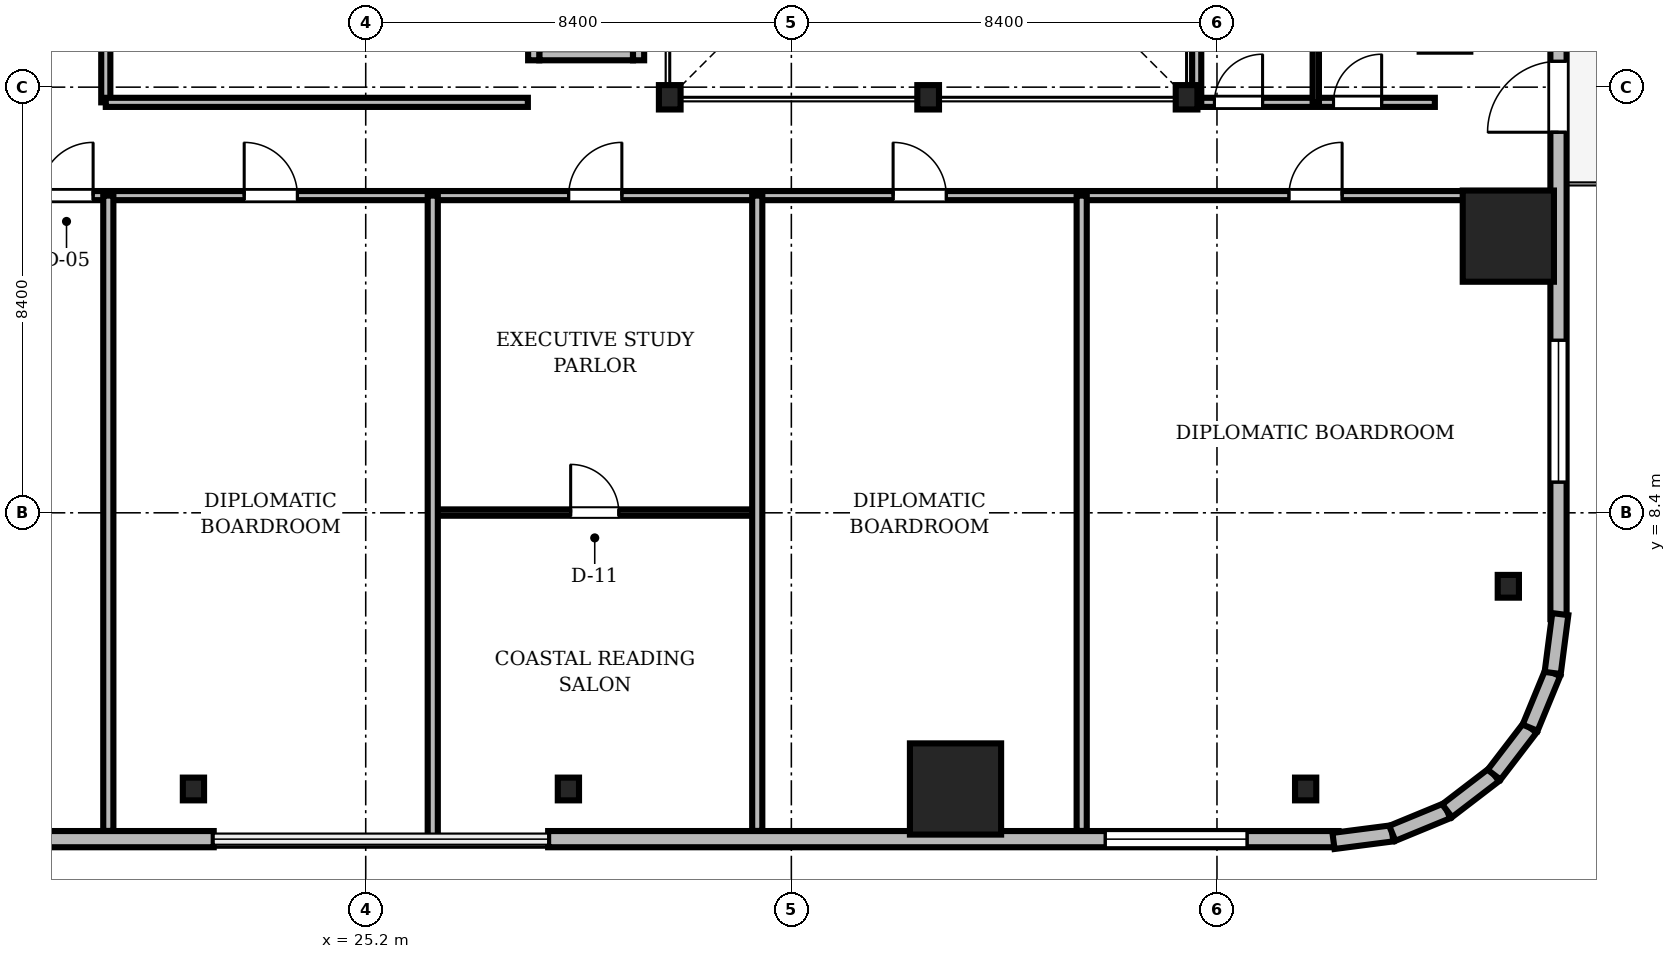
"""IFC4 building model, lengths in metres.
Left out: names, types, materials, properties, quantities, classifications, styles, units other than length and angle.
Written with IfcOpenShell. Run it as: python <this file> out.ifc"""

import sys

from ifc_helpers import new_model, si_unit, direction, frame, frame_2d, origin, origin_2d, place, context, subcontext, project, spatial, rectangle, i_section, extrude, source, transform, mapped, element, fill, save


model = new_model("IFC4")
c1 = context("Model", 3, precision=1e-05, world=origin(), true_north=direction((0.0, 1.0)))
c2 = subcontext(c1, "Body", "Model", "MODEL_VIEW")
j1 = project(units=[si_unit("LENGTHUNIT", "METRE"), si_unit("PLANEANGLEUNIT", "RADIAN")], contexts=[c1])
p1 = place(None, origin())
s1 = spatial("IfcSite", under=j1, at=p1, CompositionType="ELEMENT")
p2 = place(p1, origin())
s2 = spatial("IfcBuilding", under=s1, at=p2, CompositionType="ELEMENT")
p3 = place(p2, frame((0.0, 0.0, 34.9)))
s3 = spatial("IfcBuildingStorey", under=s2, at=p3, CompositionType="ELEMENT", Elevation=34.9)
m1 = source(origin(), c2, "Body", "SweptSolid", [
    extrude(i_section(OverallWidth=0.428, OverallDepth=0.481, WebThickness=0.04, FlangeThickness=0.063, FilletRadius=0.015, at=origin_2d()), origin(), (0.0, 0.0, 1.0), 3.41),
])
for number, where, z_axis, x_axis in (
    (1, (31.2, 16.6, 0.0), (0.0, 0.0, 1.0), (1.0, 0.0, 0.0)),
    (2, (36.3, 16.6, 0.0), (0.0, 0.0, 1.0), (1.0, 0.0, 0.0)),
    (3, (41.4, 16.6, 0.0), (0.0, 0.0, 1.0), (1.0, 0.0, 0.0)),
):
    element("IfcColumn", number, at=place(p3, frame(where, z_axis=z_axis, x_axis=x_axis)), inside=s3, PredefinedType="COLUMN", context=c2, shape_type="MappedRepresentation", body=[
        mapped(m1, transform((0.0, 0.0, 0.0), scale=1.0)),
    ])
m2 = source(origin(), c2, "Body", "SweptSolid", [
    extrude(rectangle(XDim=1.8, YDim=1.8, at=origin_2d()), origin(), (0.0, 0.0, 1.0), 3.41),
])
for number, where, z_axis, x_axis in (
    (4, (36.84, 2.95, 0.0), (0.0, 0.0, 1.0), (1.0, 0.0, 0.0)),
    (5, (47.75, 13.86, 0.0), (0.0, 0.0, 1.0), (1.0, 0.0, 0.0)),
):
    element("IfcColumn", number, at=place(p3, frame(where, z_axis=z_axis, x_axis=x_axis)), inside=s3, PredefinedType="COLUMN", context=c2, shape_type="MappedRepresentation", body=[
        mapped(m2, transform((0.0, 0.0, 0.0), scale=1.0)),
    ])
m3 = source(origin(), c2, "Body", "SweptSolid", [
    extrude(i_section(OverallWidth=0.419, OverallDepth=0.449, WebThickness=0.031, FlangeThickness=0.048, FilletRadius=0.015, at=origin_2d()), origin(), (0.0, 0.0, 1.0), 3.41),
])
for number, where, z_axis, x_axis in (
    (6, (21.8, 2.95, 0.0), (0.0, 0.0, 1.0), (1.0, 0.0, 0.0)),
    (7, (29.2, 2.95, 0.0), (0.0, 0.0, 1.0), (1.0, 0.0, 0.0)),
    (8, (43.75, 2.95, 0.0), (0.0, 0.0, 1.0), (1.0, 0.0, 0.0)),
    (9, (47.75, 6.95, 0.0), (0.0, 0.0, 1.0), (1.0, 0.0, 0.0)),
):
    element("IfcColumn", number, at=place(p3, frame(where, z_axis=z_axis, x_axis=x_axis)), inside=s3, PredefinedType="COLUMN", context=c2, shape_type="MappedRepresentation", body=[
        mapped(m3, transform((0.0, 0.0, 0.0), scale=1.0)),
    ])
m4 = source(origin(), c2, "Body", "SweptSolid", [
    extrude(rectangle(XDim=15.6, YDim=0.32, at=frame_2d((7.8, 0.0))), origin(), (0.0, 0.0, 1.0), 3.41),
])
p4 = place(p3, frame((6.6, 1.96, 0.0), z_axis=(0.0, 0.0, 1.0), x_axis=(1.0, 0.0, 0.0)))
e10 = element("IfcWall", 10, at=p4, inside=s3, PredefinedType="SOLIDWALL", context=c2, shape_type="MappedRepresentation", body=[
    mapped(m4, transform((0.0, 0.0, 0.0), scale=1.0)),
])
m5 = source(origin(), c2, "Body", "SweptSolid", [
    extrude(rectangle(XDim=1.4, YDim=2.3, at=frame_2d((0.7, 1.15))), frame((0.0, 0.17, 0.0), z_axis=(0.0, -1.0, 0.0), x_axis=(1.0, 0.0, 0.0)), (0.0, 0.0, 1.0), 0.34),
])
p5 = place(p4, frame((9.61, 0.0, 0.0)))
e11 = element("IfcOpeningElement", 11, at=p5, cuts=e10, PredefinedType="OPENING", context=c2, shape_type="MappedRepresentation", body=[
    mapped(m5, transform((0.0, 0.0, 0.0), scale=1.0)),
])
m6 = source(origin(), c2, "Body", "SweptSolid", [
    extrude(rectangle(XDim=2.8, YDim=2.4, at=frame_2d((1.4, 1.2))), frame((0.0, 0.17, 0.0), z_axis=(0.0, -1.0, 0.0), x_axis=(1.0, 0.0, 0.0)), (0.0, 0.0, 1.0), 0.34),
])
p6 = place(p4, frame((2.705, 0.0, 0.72)))
e12 = element("IfcOpeningElement", 12, at=p6, cuts=e10, PredefinedType="OPENING", context=c2, shape_type="MappedRepresentation", body=[
    mapped(m6, transform((0.0, 0.0, 0.0), scale=1.0)),
])
p7 = place(p3, frame((28.8, 1.96, 0.0), z_axis=(0.0, 0.0, 1.0), x_axis=(1.0, 0.0, 0.0)))
e13 = element("IfcWall", 13, at=p7, inside=s3, PredefinedType="SOLIDWALL", context=c2, shape_type="MappedRepresentation", body=[
    mapped(m4, transform((0.0, 0.0, 0.0), scale=1.0)),
])
p8 = place(p7, frame((10.995, 0.0, 0.72)))
e14 = element("IfcOpeningElement", 14, at=p8, cuts=e13, PredefinedType="OPENING", context=c2, shape_type="MappedRepresentation", body=[
    mapped(m6, transform((0.0, 0.0, 0.0), scale=1.0)),
])
p9 = place(p3, frame((48.74, 6.3, 0.0), z_axis=(0.0, 0.0, 1.0), x_axis=(0.0, 1.0, 0.0)))
e15 = element("IfcWall", 15, at=p9, inside=s3, PredefinedType="SOLIDWALL", context=c2, shape_type="MappedRepresentation", body=[
    mapped(m4, transform((0.0, 0.0, 0.0), scale=1.0)),
])
p10 = place(p9, frame((9.61, 0.0, 0.0)))
e16 = element("IfcOpeningElement", 16, at=p10, cuts=e15, PredefinedType="OPENING", context=c2, shape_type="MappedRepresentation", body=[
    mapped(m5, transform((0.0, 0.0, 0.0), scale=1.0)),
])
p11 = place(p9, frame((2.705, 0.0, 0.72)))
e17 = element("IfcOpeningElement", 17, at=p11, cuts=e15, PredefinedType="OPENING", context=c2, shape_type="MappedRepresentation", body=[
    mapped(m6, transform((0.0, 0.0, 0.0), scale=1.0)),
])
m7 = source(origin(), c2, "Body", "SweptSolid", [
    extrude(rectangle(XDim=1.17, YDim=0.32, at=frame_2d((0.585, 0.0))), origin(), (0.0, 0.0, 1.0), 3.41),
])
p12 = place(p3, frame((44.3, 1.925, 0.0), z_axis=(0.0, 0.0, 1.0), x_axis=(0.991762485493, 0.128090485085, 0.0)))
e18 = element("IfcWall", 18, at=p12, inside=s3, PredefinedType="SOLIDWALL", context=c2, shape_type="MappedRepresentation", body=[
    mapped(m7, transform((0.0, 0.0, 0.0), scale=1.0)),
])
m8 = source(origin(), c2, "Body", "SweptSolid", [
    extrude(rectangle(XDim=1.169, YDim=0.32, at=frame_2d((0.585, 0.0))), origin(), (0.0, 0.0, 1.0), 3.41),
])
p13 = place(p3, frame((45.46, 2.074, 0.0), z_axis=(0.0, 0.0, 1.0), x_axis=(0.924479075121, 0.381232789334, 0.0)))
e19 = element("IfcWall", 19, at=p13, inside=s3, PredefinedType="SOLIDWALL", context=c2, shape_type="MappedRepresentation", body=[
    mapped(m8, transform((0.0, 0.0, 0.0), scale=1.0)),
])
m9 = source(origin(), c2, "Body", "SweptSolid", [
    extrude(rectangle(XDim=1.169, YDim=0.32, at=frame_2d((0.584, 0.0))), origin(), (0.0, 0.0, 1.0), 3.41),
])
p14 = place(p3, frame((46.541, 2.52, 0.0), z_axis=(0.0, 0.0, 1.0), x_axis=(0.793663520347, 0.608356981114, 0.0)))
e20 = element("IfcWall", 20, at=p14, inside=s3, PredefinedType="SOLIDWALL", context=c2, shape_type="MappedRepresentation", body=[
    mapped(m9, transform((0.0, 0.0, 0.0), scale=1.0)),
])
m10 = source(origin(), c2, "Body", "SweptSolid", [
    extrude(rectangle(XDim=1.169, YDim=0.32, at=frame_2d((0.584, 0.0))), origin(), (0.0, 0.0, 1.0), 3.41),
])
for number, where, z_axis, x_axis in (
    (21, (47.469, 3.231, 0.0), (0.0, 0.0, 1.0), (0.608, 0.794, 0.0)),
    (22, (48.18, 4.159, 0.0), (0.0, 0.0, 1.0), (0.381, 0.925, 0.0)),
):
    element("IfcWall", number, at=place(p3, frame(where, z_axis=z_axis, x_axis=x_axis)), inside=s3, PredefinedType="SOLIDWALL", context=c2, shape_type="MappedRepresentation", body=[
        mapped(m10, transform((0.0, 0.0, 0.0), scale=1.0)),
    ])
m11 = source(origin(), c2, "Body", "SweptSolid", [
    extrude(rectangle(XDim=1.171, YDim=0.32, at=frame_2d((0.585, 0.0))), origin(), (0.0, 0.0, 1.0), 3.41),
])
p15 = place(p3, frame((48.625, 5.24, 0.0), z_axis=(0.0, 0.0, 1.0), x_axis=(0.128269133229, 0.991739395941, 0.0)))
e23 = element("IfcWall", 23, at=p15, inside=s3, PredefinedType="SOLIDWALL", context=c2, shape_type="MappedRepresentation", body=[
    mapped(m11, transform((0.0, 0.0, 0.0), scale=1.0)),
])
m12 = source(origin(), c2, "Body", "SweptSolid", [
    extrude(rectangle(XDim=1.85, YDim=0.22, at=frame_2d((0.925, 0.0))), origin(), (0.0, 0.0, 1.0), 3.41),
])
p16 = place(p3, frame((28.625, 17.44, 0.0), z_axis=(0.0, 0.0, 1.0), x_axis=(1.0, 0.0, 0.0)))
e24 = element("IfcWall", 24, at=p16, inside=s3, PredefinedType="SOLIDWALL", context=c2, shape_type="MappedRepresentation", body=[
    mapped(m12, transform((0.0, 0.0, 0.0), scale=1.0)),
])
m13 = source(origin(), c2, "Body", "SweptSolid", [
    extrude(rectangle(XDim=2.54, YDim=0.22, at=frame_2d((1.27, 0.0))), origin(), (0.0, 0.0, 1.0), 3.41),
])
for number, where, z_axis, x_axis in (
    (25, (28.515, 17.33, 0.0), (0.0, 0.0, 1.0), (0.0, 1.0, 0.0)),
    (26, (30.585, 17.33, 0.0), (0.0, 0.0, 1.0), (0.0, 1.0, 0.0)),
):
    element("IfcWall", number, at=place(p3, frame(where, z_axis=z_axis, x_axis=x_axis)), inside=s3, PredefinedType="SOLIDWALL", context=c2, shape_type="MappedRepresentation", body=[
        mapped(m13, transform((0.0, 0.0, 0.0), scale=1.0)),
    ])
m14 = source(origin(), c2, "Body", "SweptSolid", [
    extrude(rectangle(XDim=46.156, YDim=0.18, at=frame_2d((23.078, 0.0))), origin(), (0.0, 0.0, 1.0), 2.652),
])
p17 = place(p3, frame((2.422, 14.66, 0.0), z_axis=(0.0, 0.0, 1.0), x_axis=(1.0, 0.0, 0.0)))
e27 = element("IfcWall", 27, at=p17, inside=s3, PredefinedType="PARTITIONING", context=c2, shape_type="MappedRepresentation", body=[
    mapped(m14, transform((0.0, 0.0, 0.0), scale=1.0)),
])
m15 = source(origin(), c2, "Body", "SweptSolid", [
    extrude(rectangle(XDim=1.05, YDim=2.2, at=frame_2d((0.525, 1.1))), frame((0.0, 0.1, 0.0), z_axis=(0.0, -1.0, 0.0), x_axis=(1.0, 0.0, 0.0)), (0.0, 0.0, 1.0), 0.2),
])
p18 = place(p17, frame((16.348, 0.0, 0.0)))
e28 = element("IfcOpeningElement", 28, at=p18, cuts=e27, PredefinedType="OPENING", context=c2, shape_type="MappedRepresentation", body=[
    mapped(m15, transform((0.0, 0.0, 0.0), scale=1.0)),
])
p19 = place(p17, frame((20.38, 0.0, 0.0)))
e29 = element("IfcOpeningElement", 29, at=p19, cuts=e27, PredefinedType="OPENING", context=c2, shape_type="MappedRepresentation", body=[
    mapped(m15, transform((0.0, 0.0, 0.0), scale=1.0)),
])
p20 = place(p17, frame((26.783, 0.0, 0.0)))
e30 = element("IfcOpeningElement", 30, at=p20, cuts=e27, PredefinedType="OPENING", context=c2, shape_type="MappedRepresentation", body=[
    mapped(m15, transform((0.0, 0.0, 0.0), scale=1.0)),
])
p21 = place(p17, frame((33.186, 0.0, 0.0)))
e31 = element("IfcOpeningElement", 31, at=p21, cuts=e27, PredefinedType="OPENING", context=c2, shape_type="MappedRepresentation", body=[
    mapped(m15, transform((0.0, 0.0, 0.0), scale=1.0)),
])
p22 = place(p17, frame((40.998, 0.0, 0.0)))
e32 = element("IfcOpeningElement", 32, at=p22, cuts=e27, PredefinedType="OPENING", context=c2, shape_type="MappedRepresentation", body=[
    mapped(m15, transform((0.0, 0.0, 0.0), scale=1.0)),
])
m16 = source(origin(), c2, "Body", "SweptSolid", [
    extrude(rectangle(XDim=6.404, YDim=0.125, at=frame_2d((3.202, 0.0))), origin(), (0.0, 0.0, 1.0), 2.802),
])
p23 = place(p3, frame((26.523, 8.405, 0.0), z_axis=(0.0, 0.0, 1.0), x_axis=(1.0, 0.0, 0.0)))
e33 = element("IfcWall", 33, at=p23, inside=s3, PredefinedType="PARTITIONING", context=c2, shape_type="MappedRepresentation", body=[
    mapped(m16, transform((0.0, 0.0, 0.0), scale=1.0)),
])
m17 = source(origin(), c2, "Body", "SweptSolid", [
    extrude(rectangle(XDim=0.95, YDim=2.15, at=frame_2d((0.475, 1.075))), frame((0.0, 0.073, 0.0), z_axis=(0.0, -1.0, 0.0), x_axis=(1.0, 0.0, 0.0)), (0.0, 0.0, 1.0), 0.145),
])
p24 = place(p23, frame((2.722, 0.0, 0.0)))
e34 = element("IfcOpeningElement", 34, at=p24, cuts=e33, PredefinedType="OPENING", context=c2, shape_type="MappedRepresentation", body=[
    mapped(m17, transform((0.0, 0.0, 0.0), scale=1.0)),
])
m18 = source(origin(), c2, "Body", "SweptSolid", [
    extrude(rectangle(XDim=4.7, YDim=0.18, at=frame_2d((2.35, 0.0))), origin(), (0.0, 0.0, 1.0), 2.802),
])
p25 = place(p3, frame((41.6, 16.5, 0.0), z_axis=(0.0, 0.0, 1.0), x_axis=(1.0, 0.0, 0.0)))
e35 = element("IfcWall", 35, at=p25, inside=s3, PredefinedType="PARTITIONING", context=c2, shape_type="MappedRepresentation", body=[
    mapped(m18, transform((0.0, 0.0, 0.0), scale=1.0)),
])
m19 = source(origin(), c2, "Body", "SweptSolid", [
    extrude(rectangle(XDim=0.95, YDim=2.15, at=frame_2d((0.475, 1.075))), frame((0.0, 0.1, 0.0), z_axis=(0.0, -1.0, 0.0), x_axis=(1.0, 0.0, 0.0)), (0.0, 0.0, 1.0), 0.2),
])
p26 = place(p25, frame((0.35, 0.0, 0.0)))
e36 = element("IfcOpeningElement", 36, at=p26, cuts=e35, PredefinedType="OPENING", context=c2, shape_type="MappedRepresentation", body=[
    mapped(m19, transform((0.0, 0.0, 0.0), scale=1.0)),
])
p27 = place(p25, frame((2.7, 0.0, 0.0)))
e37 = element("IfcOpeningElement", 37, at=p27, cuts=e35, PredefinedType="OPENING", context=c2, shape_type="MappedRepresentation", body=[
    mapped(m19, transform((0.0, 0.0, 0.0), scale=1.0)),
])
m20 = source(origin(), c2, "Body", "SweptSolid", [
    extrude(rectangle(XDim=3.55, YDim=0.18, at=frame_2d((1.775, 0.0))), origin(), (0.0, 0.0, 1.0), 2.802),
])
p28 = place(p3, frame((20.07, 16.5, 0.0), z_axis=(0.0, 0.0, 1.0), x_axis=(0.0, 1.0, 0.0)))
e38 = element("IfcWall", 38, at=p28, inside=s3, PredefinedType="PARTITIONING", context=c2, shape_type="MappedRepresentation", body=[
    mapped(m20, transform((0.0, 0.0, 0.0), scale=1.0)),
])
p29 = place(p28, frame((1.15, 0.0, 0.0)))
e39 = element("IfcOpeningElement", 39, at=p29, cuts=e38, PredefinedType="OPENING", context=c2, shape_type="MappedRepresentation", body=[
    mapped(m15, transform((0.0, 0.0, 0.0), scale=1.0)),
])
m21 = source(origin(), c2, "Body", "SweptSolid", [
    extrude(rectangle(XDim=12.538, YDim=0.2, at=frame_2d((6.269, 0.0))), origin(), (0.0, 0.0, 1.0), 2.652),
])
p30 = place(p3, frame((20.12, 2.122, 0.0), z_axis=(0.0, 0.0, 1.0), x_axis=(0.0, 1.0, 0.0)))
e40 = element("IfcWall", 40, at=p30, inside=s3, PredefinedType="PARTITIONING", context=c2, shape_type="MappedRepresentation", body=[
    mapped(m21, transform((0.0, 0.0, 0.0), scale=1.0)),
])
m22 = source(origin(), c2, "Body", "SweptSolid", [
    extrude(rectangle(XDim=12.73, YDim=0.2, at=frame_2d((6.365, 0.0))), origin(), (0.0, 0.0, 1.0), 2.652),
])
p31 = place(p3, frame((26.523, 1.93, 0.0), z_axis=(0.0, 0.0, 1.0), x_axis=(0.0, 1.0, 0.0)))
e41 = element("IfcWall", 41, at=p31, inside=s3, PredefinedType="PARTITIONING", context=c2, shape_type="MappedRepresentation", body=[
    mapped(m22, transform((0.0, 0.0, 0.0), scale=1.0)),
])
for number, where, z_axis, x_axis in (
    (42, (32.927, 2.122, 0.0), (0.0, 0.0, 1.0), (0.0, 1.0, 0.0)),
    (43, (39.33, 2.122, 0.0), (0.0, 0.0, 1.0), (0.0, 1.0, 0.0)),
):
    element("IfcWall", number, at=place(p3, frame(where, z_axis=z_axis, x_axis=x_axis)), inside=s3, PredefinedType="PARTITIONING", context=c2, shape_type="MappedRepresentation", body=[
        mapped(m21, transform((0.0, 0.0, 0.0), scale=1.0)),
    ])
m23 = source(origin(), c2, "Body", "SweptSolid", [
    extrude(rectangle(XDim=8.33, YDim=0.18, at=frame_2d((4.165, 0.0))), origin(), (0.0, 0.0, 1.0), 2.802),
])
p32 = place(p3, frame((20.07, 16.5, 0.0), z_axis=(0.0, 0.0, 1.0), x_axis=(1.0, 0.0, 0.0)))
e44 = element("IfcWall", 44, at=p32, inside=s3, PredefinedType="PARTITIONING", context=c2, shape_type="MappedRepresentation", body=[
    mapped(m23, transform((0.0, 0.0, 0.0), scale=1.0)),
])
m24 = source(origin(), c2, "Body", "SweptSolid", [
    extrude(rectangle(XDim=7.15, YDim=0.18, at=frame_2d((3.575, 0.0))), origin(), (0.0, 0.0, 1.0), 2.802),
])
p33 = place(p3, frame((41.6, 16.5, 0.0), z_axis=(0.0, 0.0, 1.0), x_axis=(0.0, 1.0, 0.0)))
e45 = element("IfcWall", 45, at=p33, inside=s3, PredefinedType="PARTITIONING", context=c2, shape_type="MappedRepresentation", body=[
    mapped(m24, transform((0.0, 0.0, 0.0), scale=1.0)),
])
m25 = source(origin(), c2, "Body", "SweptSolid", [
    extrude(rectangle(XDim=7.15, YDim=0.125, at=frame_2d((3.575, 0.0))), origin(), (0.0, 0.0, 1.0), 2.802),
])
p34 = place(p3, frame((43.95, 16.5, 0.0), z_axis=(0.0, 0.0, 1.0), x_axis=(0.0, 1.0, 0.0)))
e46 = element("IfcWall", 46, at=p34, inside=s3, PredefinedType="PARTITIONING", context=c2, shape_type="MappedRepresentation", body=[
    mapped(m25, transform((0.0, 0.0, 0.0), scale=1.0)),
])
m26 = source(origin(), c2, "Body", "SweptSolid", [
    extrude(rectangle(XDim=2.8, YDim=2.4, at=frame_2d((1.4, 1.2))), frame((0.0, 0.03, 0.0), z_axis=(0.0, -1.0, 0.0), x_axis=(1.0, 0.0, 0.0)), (0.0, 0.0, 1.0), 0.06),
])
p35 = place(p8, origin())
e47 = element("IfcWindow", 47, at=p35, inside=s3, PartitioningType="SINGLE_PANEL", PredefinedType="WINDOW", context=c2, shape_type="MappedRepresentation", body=[
    mapped(m26, transform((0.0, 0.0, 0.0), scale=1.0)),
])
fill(e14, e47)
m27 = source(origin(), c2, "Body", "SweptSolid", [
    extrude(rectangle(XDim=1.4, YDim=2.3, at=frame_2d((0.7, 1.15))), frame((0.0, 0.025, 0.0), z_axis=(0.0, -1.0, 0.0), x_axis=(1.0, 0.0, 0.0)), (0.0, 0.0, 1.0), 0.05),
])
p36 = place(p10, frame((1.4, 0.0, 0.0), z_axis=(0.0, 0.0, 1.0), x_axis=(-1.0, 0.0, 0.0)))
e48 = element("IfcDoor", 48, at=p36, inside=s3, OperationType="DOUBLE_DOOR_SLIDING", PredefinedType="DOOR", context=c2, shape_type="MappedRepresentation", body=[
    mapped(m27, transform((0.0, 0.0, 0.0), scale=1.0)),
])
fill(e16, e48)
p37 = place(p11, origin())
e49 = element("IfcWindow", 49, at=p37, inside=s3, PartitioningType="SINGLE_PANEL", PredefinedType="WINDOW", context=c2, shape_type="MappedRepresentation", body=[
    mapped(m26, transform((0.0, 0.0, 0.0), scale=1.0)),
])
fill(e17, e49)
m28 = source(origin(), c2, "Body", "SweptSolid", [
    extrude(rectangle(XDim=1.05, YDim=2.2, at=frame_2d((0.525, 1.1))), frame((0.0, 0.025, 0.0), z_axis=(0.0, -1.0, 0.0), x_axis=(1.0, 0.0, 0.0)), (0.0, 0.0, 1.0), 0.05),
])
p38 = place(p18, origin())
e50 = element("IfcDoor", 50, at=p38, inside=s3, OperationType="SINGLE_SWING_RIGHT", PredefinedType="DOOR", context=c2, shape_type="MappedRepresentation", body=[
    mapped(m28, transform((0.0, 0.0, 0.0), scale=1.0)),
])
fill(e28, e50)
p39 = place(p19, origin())
e51 = element("IfcDoor", 51, at=p39, inside=s3, OperationType="SINGLE_SWING_LEFT", PredefinedType="DOOR", context=c2, shape_type="MappedRepresentation", body=[
    mapped(m28, transform((0.0, 0.0, 0.0), scale=1.0)),
])
fill(e29, e51)
p40 = place(p20, origin())
e52 = element("IfcDoor", 52, at=p40, inside=s3, OperationType="SINGLE_SWING_RIGHT", PredefinedType="DOOR", context=c2, shape_type="MappedRepresentation", body=[
    mapped(m28, transform((0.0, 0.0, 0.0), scale=1.0)),
])
fill(e30, e52)
p41 = place(p21, origin())
e53 = element("IfcDoor", 53, at=p41, inside=s3, OperationType="SINGLE_SWING_LEFT", PredefinedType="DOOR", context=c2, shape_type="MappedRepresentation", body=[
    mapped(m28, transform((0.0, 0.0, 0.0), scale=1.0)),
])
fill(e31, e53)
p42 = place(p22, origin())
e54 = element("IfcDoor", 54, at=p42, inside=s3, OperationType="SINGLE_SWING_RIGHT", PredefinedType="DOOR", context=c2, shape_type="MappedRepresentation", body=[
    mapped(m28, transform((0.0, 0.0, 0.0), scale=1.0)),
])
fill(e32, e54)
m29 = source(origin(), c2, "Body", "SweptSolid", [
    extrude(rectangle(XDim=0.95, YDim=2.15, at=frame_2d((0.475, 1.075))), frame((0.0, 0.025, 0.0), z_axis=(0.0, -1.0, 0.0), x_axis=(1.0, 0.0, 0.0)), (0.0, 0.0, 1.0), 0.05),
])
p43 = place(p24, origin())
e55 = element("IfcDoor", 55, at=p43, inside=s3, OperationType="SINGLE_SWING_LEFT", PredefinedType="DOOR", context=c2, shape_type="MappedRepresentation", body=[
    mapped(m29, transform((0.0, 0.0, 0.0), scale=1.0)),
])
fill(e34, e55)
p44 = place(p26, origin())
e56 = element("IfcDoor", 56, at=p44, inside=s3, OperationType="SINGLE_SWING_RIGHT", PredefinedType="DOOR", context=c2, shape_type="MappedRepresentation", body=[
    mapped(m29, transform((0.0, 0.0, 0.0), scale=1.0)),
])
fill(e36, e56)
p45 = place(p27, origin())
e57 = element("IfcDoor", 57, at=p45, inside=s3, OperationType="SINGLE_SWING_RIGHT", PredefinedType="DOOR", context=c2, shape_type="MappedRepresentation", body=[
    mapped(m29, transform((0.0, 0.0, 0.0), scale=1.0)),
])
fill(e37, e57)
save(model, sys.argv[1])
